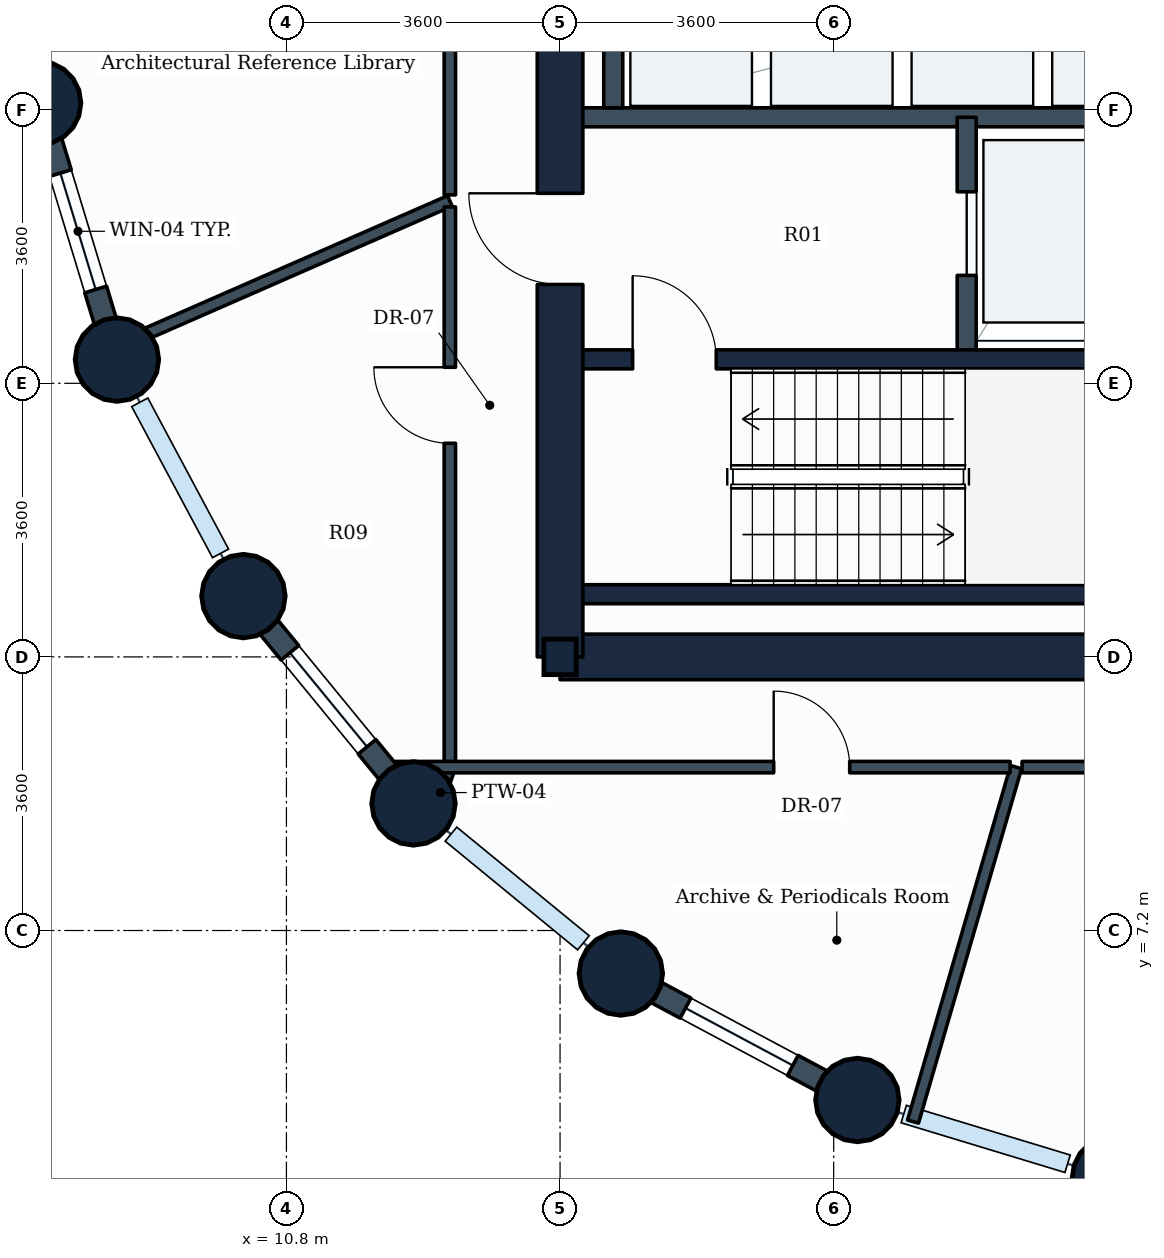
"""IFC4 building model, lengths in metres.
Left out: names, types, materials, properties, quantities, classifications, styles, units other than length and angle.
Written with IfcOpenShell. Run it as: python <this file> out.ifc"""

import sys

from ifc_helpers import new_model, si_unit, direction, frame, frame_2d, origin, origin_2d, place, context, subcontext, project, spatial, rectangle, circle, i_section, extrude, element, fill, save


model = new_model("IFC4")
c1 = context("Model", 3, precision=1e-05, world=origin(), true_north=direction((0.0, 1.0)))
c2 = subcontext(c1, "Body", "Model", "MODEL_VIEW")
j1 = project(units=[si_unit("LENGTHUNIT", "METRE"), si_unit("PLANEANGLEUNIT", "RADIAN")], contexts=[c1])
p1 = place(None, origin())
s1 = spatial("IfcSite", under=j1, at=p1, CompositionType="ELEMENT")
p2 = place(p1, origin())
s2 = spatial("IfcBuilding", under=s1, at=p2, CompositionType="ELEMENT")
p3 = place(p2, frame((0.0, 0.0, 39.6)))
s3 = spatial("IfcBuildingStorey", under=s2, at=p3, CompositionType="ELEMENT", Elevation=39.6)
for number, where, z_axis, x_axis in (
    (1, (7.546, 18.088, 0.0), (0.0, 0.0, 1.0), (1.0, 0.0, 0.0)),
    (2, (8.57, 14.712, 0.0), (0.0, 0.0, 1.0), (1.0, 0.0, 0.0)),
    (3, (10.234, 11.6, 0.0), (0.0, 0.0, 1.0), (1.0, 0.0, 0.0)),
    (4, (12.472, 8.872, 0.0), (0.0, 0.0, 1.0), (1.0, 0.0, 0.0)),
):
    element("IfcColumn", number, at=place(p3, frame(where, z_axis=z_axis, x_axis=x_axis)), inside=s3, PredefinedType="COLUMN", context=c2, shape_type="SweptSolid", body=[
        extrude(circle(Radius=0.55, at=origin_2d()), origin(), (0.0, 0.0, 1.0), 3.9),
    ])
p4 = place(p3, frame((14.4, 10.8, 0.0), z_axis=(0.0, 0.0, 1.0), x_axis=(1.0, 0.0, 0.0)))
e5 = element("IfcColumn", 5, at=p4, inside=s3, PredefinedType="COLUMN", context=c2, shape_type="SweptSolid", body=[
    extrude(i_section(OverallWidth=0.424, OverallDepth=0.467, WebThickness=0.033, FlangeThickness=0.053, FilletRadius=0.015, at=origin_2d()), origin(), (0.0, 0.0, 1.0), 3.9),
])
for number, where, z_axis, x_axis in (
    (6, (15.2, 6.634, 0.0), (0.0, 0.0, 1.0), (1.0, 0.0, 0.0)),
    (7, (18.312, 4.97, 0.0), (0.0, 0.0, 1.0), (1.0, 0.0, 0.0)),
    (8, (21.688, 3.946, 0.0), (0.0, 0.0, 1.0), (1.0, 0.0, 0.0)),
):
    element("IfcColumn", number, at=place(p3, frame(where, z_axis=z_axis, x_axis=x_axis)), inside=s3, PredefinedType="COLUMN", context=c2, shape_type="SweptSolid", body=[
        extrude(circle(Radius=0.55, at=origin_2d()), origin(), (0.0, 0.0, 1.0), 3.9),
    ])
p5 = place(p3, frame((8.57, 14.712, 0.0), z_axis=(0.0, 0.0, 1.0), x_axis=(-0.290305086481, 0.956934144423, 0.0)))
e9 = element("IfcWall", 9, at=p5, inside=s3, PredefinedType="STANDARD", context=c2, shape_type="SweptSolid", body=[
    extrude(rectangle(XDim=3.528, YDim=0.3, at=frame_2d((1.764, 0.0))), origin(), (0.0, 0.0, 1.0), 2.93),
])
p6 = place(p5, frame((0.964, 0.0, 0.85)))
e10 = element("IfcOpeningElement", 10, at=p6, cuts=e9, PredefinedType="OPENING", context=c2, shape_type="SweptSolid", body=[
    extrude(rectangle(XDim=1.6, YDim=1.35, at=frame_2d((0.8, 0.675))), frame((0.0, 0.16, 0.0), z_axis=(0.0, -1.0, 0.0), x_axis=(1.0, 0.0, 0.0)), (0.0, 0.0, 1.0), 0.32),
])
p7 = place(p3, frame((12.472, 8.872, 0.0), z_axis=(0.0, 0.0, 1.0), x_axis=(-0.634258295121, 0.773121216285, 0.0)))
e11 = element("IfcWall", 11, at=p7, inside=s3, PredefinedType="STANDARD", context=c2, shape_type="SweptSolid", body=[
    extrude(rectangle(XDim=3.529, YDim=0.3, at=frame_2d((1.764, 0.0))), origin(), (0.0, 0.0, 1.0), 2.93),
])
p8 = place(p7, frame((0.964, 0.0, 0.85)))
e12 = element("IfcOpeningElement", 12, at=p8, cuts=e11, PredefinedType="OPENING", context=c2, shape_type="SweptSolid", body=[
    extrude(rectangle(XDim=1.6, YDim=1.35, at=frame_2d((0.8, 0.675))), frame((0.0, 0.16, 0.0), z_axis=(0.0, -1.0, 0.0), x_axis=(1.0, 0.0, 0.0)), (0.0, 0.0, 1.0), 0.32),
])
p9 = place(p3, frame((18.312, 4.97, 0.0), z_axis=(0.0, 0.0, 1.0), x_axis=(-0.881846862014, 0.471535907389, 0.0)))
e13 = element("IfcWall", 13, at=p9, inside=s3, PredefinedType="STANDARD", context=c2, shape_type="SweptSolid", body=[
    extrude(rectangle(XDim=3.529, YDim=0.3, at=frame_2d((1.765, 0.0))), origin(), (0.0, 0.0, 1.0), 2.93),
])
p10 = place(p9, frame((0.964, 0.0, 0.85)))
e14 = element("IfcOpeningElement", 14, at=p10, cuts=e13, PredefinedType="OPENING", context=c2, shape_type="SweptSolid", body=[
    extrude(rectangle(XDim=1.6, YDim=1.35, at=frame_2d((0.8, 0.675))), frame((0.0, 0.16, 0.0), z_axis=(0.0, -1.0, 0.0), x_axis=(1.0, 0.0, 0.0)), (0.0, 0.0, 1.0), 0.32),
])
p11 = place(p3, frame((14.4, 10.8, 0.0), z_axis=(0.0, 0.0, 1.0), x_axis=(1.0, 0.0, 0.0)))
e15 = element("IfcWall", 15, at=p11, inside=s3, PredefinedType="SHEAR", context=c2, shape_type="SweptSolid", body=[
    extrude(rectangle(XDim=18.0, YDim=0.6, at=frame_2d((9.0, 0.0))), origin(), (0.0, 0.0, 1.0), 3.65),
])
p12 = place(p3, frame((14.4, 10.8, 0.0), z_axis=(0.0, 0.0, 1.0), x_axis=(0.0, 1.0, 0.0)))
e16 = element("IfcWall", 16, at=p12, inside=s3, PredefinedType="SHEAR", context=c2, shape_type="SweptSolid", body=[
    extrude(rectangle(XDim=14.4, YDim=0.6, at=frame_2d((7.2, 0.0))), origin(), (0.0, 0.0, 1.0), 3.65),
])
p13 = place(p12, frame((11.05, 0.0, 0.0)))
e17 = element("IfcOpeningElement", 17, at=p13, cuts=e16, PredefinedType="OPENING", context=c2, shape_type="SweptSolid", body=[
    extrude(rectangle(XDim=1.1, YDim=2.1, at=frame_2d((0.55, 1.05))), frame((0.0, 0.31, 0.0), z_axis=(0.0, -1.0, 0.0), x_axis=(1.0, 0.0, 0.0)), (0.0, 0.0, 1.0), 0.62),
])
p14 = place(p12, frame((4.9, 0.0, 0.0)))
e18 = element("IfcOpeningElement", 18, at=p14, cuts=e16, PredefinedType="OPENING", context=c2, shape_type="SweptSolid", body=[
    extrude(rectangle(XDim=1.2, YDim=2.1, at=frame_2d((0.6, 1.05))), frame((0.0, 0.31, 0.0), z_axis=(0.0, -1.0, 0.0), x_axis=(1.0, 0.0, 0.0)), (0.0, 0.0, 1.0), 0.62),
])
p15 = place(p3, frame((14.7, 11.625, 0.0), z_axis=(0.0, 0.0, 1.0), x_axis=(1.0, 0.0, 0.0)))
e19 = element("IfcWall", 19, at=p15, inside=s3, PredefinedType="SHEAR", context=c2, shape_type="SweptSolid", body=[
    extrude(rectangle(XDim=8.65, YDim=0.25, at=frame_2d((4.325, 0.0))), origin(), (0.0, 0.0, 1.0), 3.65),
])
p16 = place(p3, frame((14.7, 14.715, 0.0), z_axis=(0.0, 0.0, 1.0), x_axis=(1.0, 0.0, 0.0)))
e20 = element("IfcWall", 20, at=p16, inside=s3, PredefinedType="SHEAR", context=c2, shape_type="SweptSolid", body=[
    extrude(rectangle(XDim=8.65, YDim=0.25, at=frame_2d((4.325, 0.0))), origin(), (0.0, 0.0, 1.0), 3.65),
])
p17 = place(p16, frame((0.655, 0.0, 0.0)))
e21 = element("IfcOpeningElement", 21, at=p17, cuts=e20, PredefinedType="OPENING", context=c2, shape_type="SweptSolid", body=[
    extrude(rectangle(XDim=1.1, YDim=2.1, at=frame_2d((0.55, 1.05))), frame((0.0, 0.135, 0.0), z_axis=(0.0, -1.0, 0.0), x_axis=(1.0, 0.0, 0.0)), (0.0, 0.0, 1.0), 0.27),
])
p18 = place(p3, frame((14.65, 17.9, 0.0), z_axis=(0.0, 0.0, 1.0), x_axis=(1.0, 0.0, 0.0)))
e22 = element("IfcWall", 22, at=p18, inside=s3, PredefinedType="PARTITIONING", context=c2, shape_type="SweptSolid", body=[
    extrude(rectangle(XDim=7.15, YDim=0.25, at=frame_2d((3.575, 0.0))), origin(), (0.0, 0.0, 1.0), 3.635),
])
p19 = place(p3, frame((19.75, 14.84, 0.0), z_axis=(0.0, 0.0, 1.0), x_axis=(0.0, 1.0, 0.0)))
e23 = element("IfcWall", 23, at=p19, inside=s3, PredefinedType="PARTITIONING", context=c2, shape_type="SweptSolid", body=[
    extrude(rectangle(XDim=3.06, YDim=0.25, at=frame_2d((1.53, 0.0))), origin(), (0.0, 0.0, 1.0), 3.635),
])
p20 = place(p19, frame((0.98, 0.0, 0.0)))
e24 = element("IfcOpeningElement", 24, at=p20, cuts=e23, PredefinedType="OPENING", context=c2, shape_type="SweptSolid", body=[
    extrude(rectangle(XDim=1.1, YDim=2.1, at=frame_2d((0.55, 1.05))), frame((0.0, 0.135, 0.0), z_axis=(0.0, -1.0, 0.0), x_axis=(1.0, 0.0, 0.0)), (0.0, 0.0, 1.0), 0.27),
])
p21 = place(p3, frame((15.1, 18.025, 0.0), z_axis=(0.0, 0.0, 1.0), x_axis=(0.0, 1.0, 0.0)))
e25 = element("IfcWall", 25, at=p21, inside=s3, PredefinedType="PARTITIONING", context=c2, shape_type="SweptSolid", body=[
    extrude(rectangle(XDim=1.975, YDim=0.25, at=frame_2d((0.988, 0.0))), origin(), (0.0, 0.0, 1.0), 3.635),
])
p22 = place(p3, frame((12.95, 16.8, 0.0), z_axis=(0.0, 0.0, 1.0), x_axis=(-0.916088262031, -0.400976677837, 0.0)))
e26 = element("IfcWall", 26, at=p22, inside=s3, PredefinedType="PARTITIONING", context=c2, shape_type="SweptSolid", body=[
    extrude(rectangle(XDim=4.706, YDim=0.15, at=frame_2d((2.353, 0.0))), origin(), (0.0, 0.0, 1.0), 2.93),
])
p23 = place(p3, frame((12.95, 9.35, 0.0), z_axis=(0.0, 0.0, 1.0), x_axis=(-0.341990430397, -0.939703434875, 0.0)))
e27 = element("IfcWall", 27, at=p23, inside=s3, PredefinedType="PARTITIONING", context=c2, shape_type="SweptSolid", body=[
    extrude(rectangle(XDim=0.713, YDim=0.15, at=frame_2d((0.356, 0.0))), origin(), (0.0, 0.0, 1.0), 2.93),
])
p24 = place(p3, frame((20.4, 9.35, 0.0), z_axis=(0.0, 0.0, 1.0), x_axis=(-0.27916607548, -0.960242835069, 0.0)))
e28 = element("IfcWall", 28, at=p24, inside=s3, PredefinedType="PARTITIONING", context=c2, shape_type="SweptSolid", body=[
    extrude(rectangle(XDim=4.857, YDim=0.15, at=frame_2d((2.429, 0.0))), origin(), (0.0, 0.0, 1.0), 2.93),
])
p25 = place(p3, frame((12.95, 16.879, 0.0), z_axis=(0.0, 0.0, 1.0), x_axis=(0.0, 1.0, 0.0)))
e29 = element("IfcWall", 29, at=p25, inside=s3, PredefinedType="PARTITIONING", context=c2, shape_type="SweptSolid", body=[
    extrude(rectangle(XDim=8.242, YDim=0.15, at=frame_2d((4.121, 0.0))), origin(), (0.0, 0.0, 1.0), 3.08),
])
p26 = place(p25, frame((3.621, 0.0, 0.0)))
e30 = element("IfcOpeningElement", 30, at=p26, cuts=e29, PredefinedType="OPENING", context=c2, shape_type="SweptSolid", body=[
    extrude(rectangle(XDim=1.0, YDim=2.1, at=frame_2d((0.5, 1.05))), frame((0.0, 0.085, 0.0), z_axis=(0.0, -1.0, 0.0), x_axis=(1.0, 0.0, 0.0)), (0.0, 0.0, 1.0), 0.17),
])
p27 = place(p3, frame((12.95, 9.35, 0.0), z_axis=(0.0, 0.0, 1.0), x_axis=(0.0, 1.0, 0.0)))
e31 = element("IfcWall", 31, at=p27, inside=s3, PredefinedType="PARTITIONING", context=c2, shape_type="SweptSolid", body=[
    extrude(rectangle(XDim=7.371, YDim=0.15, at=frame_2d((3.686, 0.0))), origin(), (0.0, 0.0, 1.0), 3.04),
])
p28 = place(p27, frame((4.261, 0.0, 0.0)))
e32 = element("IfcOpeningElement", 32, at=p28, cuts=e31, PredefinedType="OPENING", context=c2, shape_type="SweptSolid", body=[
    extrude(rectangle(XDim=1.0, YDim=2.1, at=frame_2d((0.5, 1.05))), frame((0.0, 0.085, 0.0), z_axis=(0.0, -1.0, 0.0), x_axis=(1.0, 0.0, 0.0)), (0.0, 0.0, 1.0), 0.17),
])
p29 = place(p3, frame((12.234, 9.35, 0.0), z_axis=(0.0, 0.0, 1.0), x_axis=(1.0, 0.0, 0.0)))
e33 = element("IfcWall", 33, at=p29, inside=s3, PredefinedType="PARTITIONING", context=c2, shape_type="SweptSolid", body=[
    extrude(rectangle(XDim=8.087, YDim=0.15, at=frame_2d((4.043, 0.0))), origin(), (0.0, 0.0, 1.0), 2.93),
])
p30 = place(p29, frame((4.977, 0.0, 0.0)))
e34 = element("IfcOpeningElement", 34, at=p30, cuts=e33, PredefinedType="OPENING", context=c2, shape_type="SweptSolid", body=[
    extrude(rectangle(XDim=1.0, YDim=2.1, at=frame_2d((0.5, 1.05))), frame((0.0, 0.085, 0.0), z_axis=(0.0, -1.0, 0.0), x_axis=(1.0, 0.0, 0.0)), (0.0, 0.0, 1.0), 0.17),
])
p31 = place(p3, frame((20.479, 9.35, 0.0), z_axis=(0.0, 0.0, 1.0), x_axis=(1.0, 0.0, 0.0)))
e35 = element("IfcWall", 35, at=p31, inside=s3, PredefinedType="PARTITIONING", context=c2, shape_type="SweptSolid", body=[
    extrude(rectangle(XDim=8.242, YDim=0.15, at=frame_2d((4.121, 0.0))), origin(), (0.0, 0.0, 1.0), 3.08),
])
p32 = place(p31, frame((3.939, 0.0, 0.0)))
e36 = element("IfcOpeningElement", 36, at=p32, cuts=e35, PredefinedType="OPENING", context=c2, shape_type="SweptSolid", body=[
    extrude(rectangle(XDim=1.0, YDim=2.1, at=frame_2d((0.5, 1.05))), frame((0.0, 0.085, 0.0), z_axis=(0.0, -1.0, 0.0), x_axis=(1.0, 0.0, 0.0)), (0.0, 0.0, 1.0), 0.17),
])
p33 = place(p6, origin())
e37 = element("IfcWindow", 37, at=p33, inside=s3, PartitioningType="SINGLE_PANEL", PredefinedType="WINDOW", context=c2, shape_type="SweptSolid", body=[
    extrude(rectangle(XDim=1.6, YDim=1.35, at=frame_2d((0.8, 0.675))), frame((0.0, 0.03, 0.0), z_axis=(0.0, -1.0, 0.0), x_axis=(1.0, 0.0, 0.0)), (0.0, 0.0, 1.0), 0.06),
])
fill(e10, e37)
p34 = place(p8, origin())
e38 = element("IfcWindow", 38, at=p34, inside=s3, PartitioningType="SINGLE_PANEL", PredefinedType="WINDOW", context=c2, shape_type="SweptSolid", body=[
    extrude(rectangle(XDim=1.6, YDim=1.35, at=frame_2d((0.8, 0.675))), frame((0.0, 0.03, 0.0), z_axis=(0.0, -1.0, 0.0), x_axis=(1.0, 0.0, 0.0)), (0.0, 0.0, 1.0), 0.06),
])
fill(e12, e38)
p35 = place(p10, origin())
e39 = element("IfcWindow", 39, at=p35, inside=s3, PartitioningType="SINGLE_PANEL", PredefinedType="WINDOW", context=c2, shape_type="SweptSolid", body=[
    extrude(rectangle(XDim=1.6, YDim=1.35, at=frame_2d((0.8, 0.675))), frame((0.0, 0.03, 0.0), z_axis=(0.0, -1.0, 0.0), x_axis=(1.0, 0.0, 0.0)), (0.0, 0.0, 1.0), 0.06),
])
fill(e14, e39)
p36 = place(p17, origin())
e40 = element("IfcDoor", 40, at=p36, inside=s3, OperationType="SINGLE_SWING_LEFT", PredefinedType="DOOR", context=c2, shape_type="SweptSolid", body=[
    extrude(rectangle(XDim=1.1, YDim=2.1, at=frame_2d((0.55, 1.05))), frame((0.0, 0.025, 0.0), z_axis=(0.0, -1.0, 0.0), x_axis=(1.0, 0.0, 0.0)), (0.0, 0.0, 1.0), 0.05),
])
fill(e21, e40)
p37 = place(p20, origin())
e41 = element("IfcDoor", 41, at=p37, inside=s3, OperationType="SLIDING_TO_LEFT", PredefinedType="DOOR", context=c2, shape_type="SweptSolid", body=[
    extrude(rectangle(XDim=1.1, YDim=2.1, at=frame_2d((0.55, 1.05))), frame((0.0, 0.025, 0.0), z_axis=(0.0, -1.0, 0.0), x_axis=(1.0, 0.0, 0.0)), (0.0, 0.0, 1.0), 0.05),
])
fill(e24, e41)
p38 = place(p14, origin())
e42 = element("IfcDoor", 42, at=p38, inside=s3, OperationType="SINGLE_SWING_RIGHT", PredefinedType="DOOR", context=c2, shape_type="SweptSolid", body=[
    extrude(rectangle(XDim=1.2, YDim=2.1, at=frame_2d((0.6, 1.05))), frame((0.0, 0.025, 0.0), z_axis=(0.0, -1.0, 0.0), x_axis=(1.0, 0.0, 0.0)), (0.0, 0.0, 1.0), 0.05),
])
fill(e18, e42)
p39 = place(p28, origin())
e43 = element("IfcDoor", 43, at=p39, inside=s3, OperationType="SINGLE_SWING_RIGHT", PredefinedType="DOOR", context=c2, shape_type="SweptSolid", body=[
    extrude(rectangle(XDim=1.0, YDim=2.1, at=frame_2d((0.5, 1.05))), frame((0.0, 0.025, 0.0), z_axis=(0.0, -1.0, 0.0), x_axis=(1.0, 0.0, 0.0)), (0.0, 0.0, 1.0), 0.05),
])
fill(e32, e43)
p40 = place(p30, origin())
e44 = element("IfcDoor", 44, at=p40, inside=s3, OperationType="SINGLE_SWING_LEFT", PredefinedType="DOOR", context=c2, shape_type="SweptSolid", body=[
    extrude(rectangle(XDim=1.0, YDim=2.1, at=frame_2d((0.5, 1.05))), frame((0.0, 0.025, 0.0), z_axis=(0.0, -1.0, 0.0), x_axis=(1.0, 0.0, 0.0)), (0.0, 0.0, 1.0), 0.05),
])
fill(e34, e44)
save(model, sys.argv[1])
